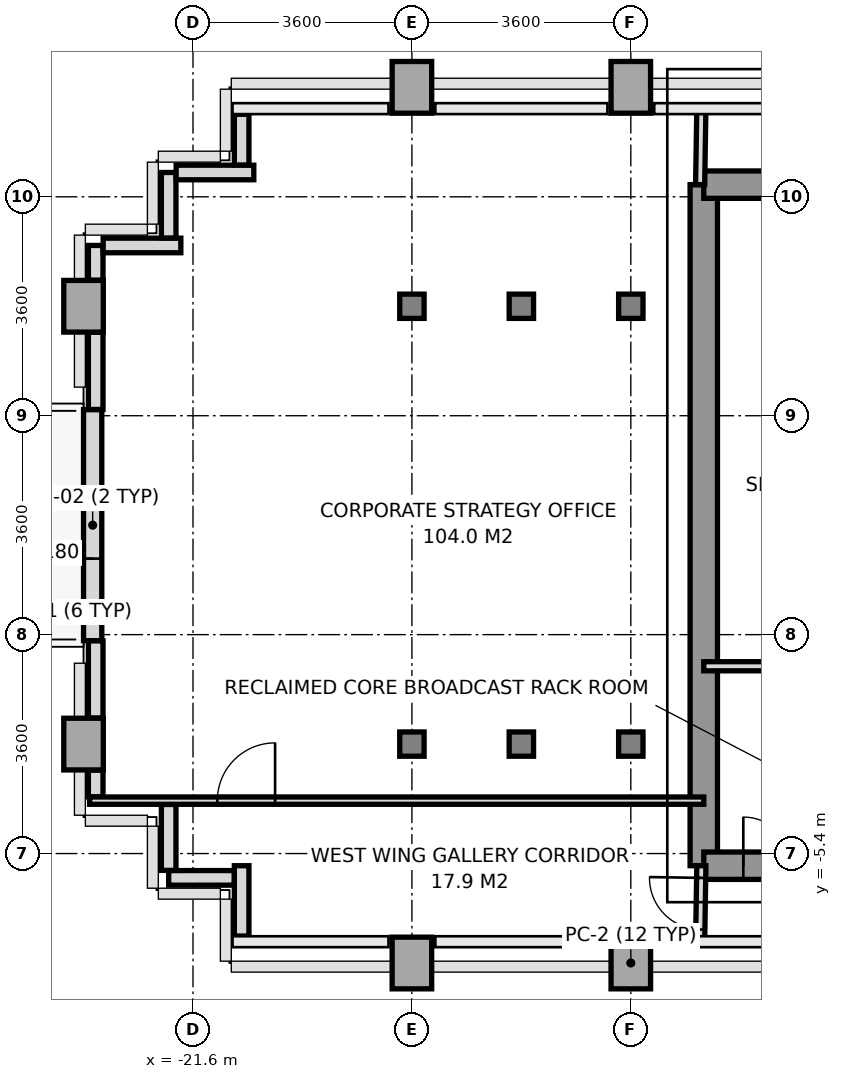
"""IFC4 building model, lengths in metres.
Left out: names, types, materials, properties, quantities, classifications, styles, units other than length and angle.
Written with IfcOpenShell. Run it as: python <this file> out.ifc"""

import sys

from ifc_helpers import new_model, si_unit, direction, frame, frame_2d, origin, origin_2d, place, context, subcontext, project, spatial, rectangle, i_section, extrude, source, transform, mapped, element, fill, save


model = new_model("IFC4")
c1 = context("Model", 3, precision=1e-05, world=origin(), true_north=direction((0.0, 1.0)))
c2 = subcontext(c1, "Body", "Model", "MODEL_VIEW")
j1 = project(units=[si_unit("LENGTHUNIT", "METRE"), si_unit("PLANEANGLEUNIT", "RADIAN")], contexts=[c1])
p1 = place(None, origin())
s1 = spatial("IfcSite", under=j1, at=p1, CompositionType="ELEMENT")
p2 = place(p1, origin())
s2 = spatial("IfcBuilding", under=s1, at=p2, CompositionType="ELEMENT")
p3 = place(p2, frame((0.0, 0.0, 100.6)))
s3 = spatial("IfcBuildingStorey", under=s2, at=p3, CompositionType="ELEMENT", Elevation=100.6)
m1 = source(origin(), c2, "Body", "SweptSolid", [
    extrude(rectangle(XDim=0.65, YDim=0.85, at=origin_2d()), origin(), (0.0, 0.0, 1.0), 3.2),
])
for number, where, z_axis, x_axis in (
    (1, (-23.4, -3.6, 0.0), (0.0, 0.0, 1.0), (1.0, 0.0, 0.0)),
    (2, (-23.4, 3.6, 0.0), (0.0, 0.0, 1.0), (1.0, 0.0, 0.0)),
    (3, (-18.0, -7.2, 0.0), (0.0, 0.0, 1.0), (1.0, 0.0, 0.0)),
):
    element("IfcColumn", number, at=place(p3, frame(where, z_axis=z_axis, x_axis=x_axis)), inside=s3, PredefinedType="COLUMN", context=c2, shape_type="MappedRepresentation", body=[
        mapped(m1, transform((0.0, 0.0, 0.0), x_axis=(1.0, 0.0, 0.0), y_axis=(0.0, 1.0, 0.0), z_axis=(0.0, 0.0, 1.0), scale=1.0)),
    ])
m2 = source(origin(), c2, "Body", "SweptSolid", [
    extrude(i_section(OverallWidth=0.401, OverallDepth=0.399, WebThickness=0.02, FlangeThickness=0.032, at=origin_2d()), origin(), (0.0, 0.0, 1.0), 3.2),
])
for number, where, z_axis, x_axis in (
    (4, (-18.0, -3.6, 0.0), (0.0, 0.0, 1.0), (1.0, 0.0, 0.0)),
    (5, (-18.0, 3.6, 0.0), (0.0, 0.0, 1.0), (1.0, 0.0, 0.0)),
):
    element("IfcColumn", number, at=place(p3, frame(where, z_axis=z_axis, x_axis=x_axis)), inside=s3, PredefinedType="COLUMN", context=c2, shape_type="MappedRepresentation", body=[
        mapped(m2, transform((0.0, 0.0, 0.0), x_axis=(1.0, 0.0, 0.0), y_axis=(0.0, 1.0, 0.0), z_axis=(0.0, 0.0, 1.0), scale=1.0)),
    ])
p4 = place(p3, frame((-18.0, 7.2, 0.0), z_axis=(0.0, 0.0, 1.0), x_axis=(1.0, 0.0, 0.0)))
e6 = element("IfcColumn", 6, at=p4, inside=s3, PredefinedType="COLUMN", context=c2, shape_type="MappedRepresentation", body=[
    mapped(m1, transform((0.0, 0.0, 0.0), x_axis=(1.0, 0.0, 0.0), y_axis=(0.0, 1.0, 0.0), z_axis=(0.0, 0.0, 1.0), scale=1.0)),
])
for number, where, z_axis, x_axis in (
    (7, (-16.2, -3.6, 0.0), (0.0, 0.0, 1.0), (1.0, 0.0, 0.0)),
    (8, (-16.2, 3.6, 0.0), (0.0, 0.0, 1.0), (1.0, 0.0, 0.0)),
):
    element("IfcColumn", number, at=place(p3, frame(where, z_axis=z_axis, x_axis=x_axis)), inside=s3, PredefinedType="COLUMN", context=c2, shape_type="MappedRepresentation", body=[
        mapped(m2, transform((0.0, 0.0, 0.0), x_axis=(1.0, 0.0, 0.0), y_axis=(0.0, 1.0, 0.0), z_axis=(0.0, 0.0, 1.0), scale=1.0)),
    ])
p5 = place(p3, frame((-14.4, -7.2, 0.0), z_axis=(0.0, 0.0, 1.0), x_axis=(1.0, 0.0, 0.0)))
e9 = element("IfcColumn", 9, at=p5, inside=s3, PredefinedType="COLUMN", context=c2, shape_type="MappedRepresentation", body=[
    mapped(m1, transform((0.0, 0.0, 0.0), x_axis=(1.0, 0.0, 0.0), y_axis=(0.0, 1.0, 0.0), z_axis=(0.0, 0.0, 1.0), scale=1.0)),
])
for number, where, z_axis, x_axis in (
    (10, (-14.4, -3.6, 0.0), (0.0, 0.0, 1.0), (1.0, 0.0, 0.0)),
    (11, (-14.4, 3.6, 0.0), (0.0, 0.0, 1.0), (1.0, 0.0, 0.0)),
):
    element("IfcColumn", number, at=place(p3, frame(where, z_axis=z_axis, x_axis=x_axis)), inside=s3, PredefinedType="COLUMN", context=c2, shape_type="MappedRepresentation", body=[
        mapped(m2, transform((0.0, 0.0, 0.0), x_axis=(1.0, 0.0, 0.0), y_axis=(0.0, 1.0, 0.0), z_axis=(0.0, 0.0, 1.0), scale=1.0)),
    ])
p6 = place(p3, frame((-14.4, 7.2, 0.0), z_axis=(0.0, 0.0, 1.0), x_axis=(1.0, 0.0, 0.0)))
e12 = element("IfcColumn", 12, at=p6, inside=s3, PredefinedType="COLUMN", context=c2, shape_type="MappedRepresentation", body=[
    mapped(m1, transform((0.0, 0.0, 0.0), x_axis=(1.0, 0.0, 0.0), y_axis=(0.0, 1.0, 0.0), z_axis=(0.0, 0.0, 1.0), scale=1.0)),
])
p7 = place(p3, frame((-23.25, -1.9, 0.0), z_axis=(0.0, 0.0, 1.0), x_axis=(0.0, 1.0, 0.0)))
e13 = element("IfcWall", 13, at=p7, inside=s3, PredefinedType="SOLIDWALL", context=c2, shape_type="SweptSolid", body=[
    extrude(rectangle(XDim=3.8, YDim=0.3, at=frame_2d((1.9, 0.0))), origin(), (0.0, 0.0, 1.0), 2.45),
])
p8 = place(p7, frame((1.35, 0.0, 0.0)))
e14 = element("IfcOpeningElement", 14, at=p8, cuts=e13, PredefinedType="OPENING", context=c2, shape_type="SweptSolid", body=[
    extrude(rectangle(XDim=1.1, YDim=2.3, at=frame_2d((0.55, 1.15))), frame((0.0, 0.16, 0.0), z_axis=(0.0, -1.0, 0.0), x_axis=(1.0, 0.0, 0.0)), (0.0, 0.0, 1.0), 0.32),
])
p9 = place(p3, frame((-20.8, -6.757, 0.0), z_axis=(0.0, 0.0, 1.0), x_axis=(0.0, 1.0, 0.0)))
e15 = element("IfcWall", 15, at=p9, inside=s3, PredefinedType="PARAPET", context=c2, shape_type="SweptSolid", body=[
    extrude(rectangle(XDim=1.157, YDim=0.24, at=frame_2d((0.579, 0.0))), origin(), (0.0, 0.0, 1.0), 1.15),
])
p10 = place(p3, frame((-20.923, -5.8, 0.0), z_axis=(0.0, 0.0, 1.0), x_axis=(-1.0, 0.0, 0.0)))
e16 = element("IfcWall", 16, at=p10, inside=s3, PredefinedType="PARAPET", context=c2, shape_type="SweptSolid", body=[
    extrude(rectangle(XDim=1.077, YDim=0.24, at=frame_2d((0.539, 0.0))), origin(), (0.0, 0.0, 1.0), 1.15),
])
p11 = place(p3, frame((-22.0, -5.677, 0.0), z_axis=(0.0, 0.0, 1.0), x_axis=(0.0, 1.0, 0.0)))
e17 = element("IfcWall", 17, at=p11, inside=s3, PredefinedType="PARAPET", context=c2, shape_type="SweptSolid", body=[
    extrude(rectangle(XDim=1.084, YDim=0.24, at=frame_2d((0.542, 0.0))), origin(), (0.0, 0.0, 1.0), 1.15),
])
p12 = place(p3, frame((-23.2, -4.467, 0.0), z_axis=(0.0, 0.0, 1.0), x_axis=(0.0, 1.0, 0.0)))
e18 = element("IfcWall", 18, at=p12, inside=s3, PredefinedType="PARAPET", context=c2, shape_type="SweptSolid", body=[
    extrude(rectangle(XDim=0.439, YDim=0.24, at=frame_2d((0.219, 0.0))), origin(), (0.0, 0.0, 1.0), 1.15),
])
for number, where, z_axis, x_axis in (
    (19, (-23.2, -3.172, 0.0), (0.0, 0.0, 1.0), (0.0, 1.0, 0.0)),
    (20, (-23.2, 1.903, 0.0), (0.0, 0.0, 1.0), (0.0, 1.0, 0.0)),
):
    element("IfcWall", number, at=place(p3, frame(where, z_axis=z_axis, x_axis=x_axis)), inside=s3, PredefinedType="PARAPET", context=c2, shape_type="SweptSolid", body=[
        extrude(rectangle(XDim=1.269, YDim=0.24, at=frame_2d((0.635, 0.0))), origin(), (0.0, 0.0, 1.0), 1.15),
    ])
p13 = place(p3, frame((-23.2, 4.028, 0.0), z_axis=(0.0, 0.0, 1.0), x_axis=(0.0, 1.0, 0.0)))
e21 = element("IfcWall", 21, at=p13, inside=s3, PredefinedType="PARAPET", context=c2, shape_type="SweptSolid", body=[
    extrude(rectangle(XDim=0.572, YDim=0.24, at=frame_2d((0.286, 0.0))), origin(), (0.0, 0.0, 1.0), 1.15),
])
p14 = place(p3, frame((-23.077, 4.6, 0.0), z_axis=(0.0, 0.0, 1.0), x_axis=(1.0, 0.0, 0.0)))
e22 = element("IfcWall", 22, at=p14, inside=s3, PredefinedType="PARAPET", context=c2, shape_type="SweptSolid", body=[
    extrude(rectangle(XDim=1.277, YDim=0.24, at=frame_2d((0.638, 0.0))), origin(), (0.0, 0.0, 1.0), 1.15),
])
p15 = place(p3, frame((-22.0, 4.723, 0.0), z_axis=(0.0, 0.0, 1.0), x_axis=(0.0, 1.0, 0.0)))
e23 = element("IfcWall", 23, at=p15, inside=s3, PredefinedType="PARAPET", context=c2, shape_type="SweptSolid", body=[
    extrude(rectangle(XDim=1.077, YDim=0.24, at=frame_2d((0.539, 0.0))), origin(), (0.0, 0.0, 1.0), 1.15),
])
p16 = place(p3, frame((-21.877, 5.8, 0.0), z_axis=(0.0, 0.0, 1.0), x_axis=(1.0, 0.0, 0.0)))
e24 = element("IfcWall", 24, at=p16, inside=s3, PredefinedType="PARAPET", context=c2, shape_type="SweptSolid", body=[
    extrude(rectangle(XDim=1.277, YDim=0.24, at=frame_2d((0.638, 0.0))), origin(), (0.0, 0.0, 1.0), 1.15),
])
p17 = place(p3, frame((-20.8, 5.923, 0.0), z_axis=(0.0, 0.0, 1.0), x_axis=(0.0, 1.0, 0.0)))
e25 = element("IfcWall", 25, at=p17, inside=s3, PredefinedType="PARAPET", context=c2, shape_type="SweptSolid", body=[
    extrude(rectangle(XDim=0.834, YDim=0.24, at=frame_2d((0.417, 0.0))), origin(), (0.0, 0.0, 1.0), 1.15),
])
p18 = place(p3, frame((-13.2, -5.6, 0.0), z_axis=(0.0, 0.0, 1.0), x_axis=(0.0, 1.0, 0.0)))
e26 = element("IfcWall", 26, at=p18, inside=s3, PredefinedType="SHEAR", context=c2, shape_type="SweptSolid", body=[
    extrude(rectangle(XDim=11.2, YDim=0.45, at=frame_2d((5.6, 0.0))), origin(), (0.0, 0.0, 1.0), 3.2),
])
p19 = place(p3, frame((-13.2, 5.6, 0.0), z_axis=(0.0, 0.0, 1.0), x_axis=(1.0, 0.0, 0.0)))
e27 = element("IfcWall", 27, at=p19, inside=s3, PredefinedType="SHEAR", context=c2, shape_type="SweptSolid", body=[
    extrude(rectangle(XDim=1.819, YDim=0.45, at=frame_2d((0.909, 0.0))), origin(), (0.0, 0.0, 1.0), 3.2),
])
p20 = place(p3, frame((-13.2, -5.6, 0.0), z_axis=(0.0, 0.0, 1.0), x_axis=(1.0, 0.0, 0.0)))
e28 = element("IfcWall", 28, at=p20, inside=s3, PredefinedType="SHEAR", context=c2, shape_type="SweptSolid", body=[
    extrude(rectangle(XDim=7.8, YDim=0.45, at=frame_2d((3.9, 0.0))), origin(), (0.0, 0.0, 1.0), 3.2),
])
p21 = place(p20, frame((3.6, 0.0, 0.0)))
e29 = element("IfcOpeningElement", 29, at=p21, cuts=e28, PredefinedType="OPENING", context=c2, shape_type="SweptSolid", body=[
    extrude(rectangle(XDim=1.2, YDim=2.2, at=frame_2d((0.6, 1.1))), frame((0.0, 0.235, 0.0), z_axis=(0.0, -1.0, 0.0), x_axis=(1.0, 0.0, 0.0)), (0.0, 0.0, 1.0), 0.47),
])
p22 = place(p20, frame((0.65, 0.0, 0.0)))
e30 = element("IfcOpeningElement", 30, at=p22, cuts=e28, PredefinedType="OPENING", context=c2, shape_type="SweptSolid", body=[
    extrude(rectangle(XDim=0.8, YDim=2.1, at=frame_2d((0.4, 1.05))), frame((0.0, 0.235, 0.0), z_axis=(0.0, -1.0, 0.0), x_axis=(1.0, 0.0, 0.0)), (0.0, 0.0, 1.0), 0.47),
])
p23 = place(p3, frame((-13.2, -2.32, 0.0), z_axis=(0.0, 0.0, 1.0), x_axis=(1.0, 0.0, 0.0)))
e31 = element("IfcWall", 31, at=p23, inside=s3, PredefinedType="PARTITIONING", context=c2, shape_type="SweptSolid", body=[
    extrude(rectangle(XDim=2.18, YDim=0.15, at=frame_2d((1.09, 0.0))), origin(), (0.0, 0.0, 1.0), 3.2),
])
p24 = place(p3, frame((-13.26, 5.6, 0.0), z_axis=(0.0, 0.0, 1.0), x_axis=(0.016013571389, 0.999871774545, 0.0)))
e32 = element("IfcWall", 32, at=p24, inside=s3, PredefinedType="PARTITIONING", context=c2, shape_type="SweptSolid", body=[
    extrude(rectangle(XDim=1.25, YDim=0.15, at=frame_2d((0.625, 0.0))), origin(), (0.0, 0.0, 1.0), 3.2),
])
p25 = place(p3, frame((-13.26, -6.85, 0.0), z_axis=(0.0, 0.0, 1.0), x_axis=(0.016013571389, 0.999871774545, 0.0)))
e33 = element("IfcWall", 33, at=p25, inside=s3, PredefinedType="PARTITIONING", context=c2, shape_type="SweptSolid", body=[
    extrude(rectangle(XDim=1.25, YDim=0.15, at=frame_2d((0.625, 0.0))), origin(), (0.0, 0.0, 1.0), 3.2),
])
p26 = place(p25, frame((0.2, 0.0, 0.0)))
e34 = element("IfcOpeningElement", 34, at=p26, cuts=e33, PredefinedType="OPENING", context=c2, shape_type="SweptSolid", body=[
    extrude(rectangle(XDim=0.85, YDim=2.1, at=frame_2d((0.425, 1.05))), frame((0.0, 0.085, 0.0), z_axis=(0.0, -1.0, 0.0), x_axis=(1.0, 0.0, 0.0)), (0.0, 0.0, 1.0), 0.17),
])
p27 = place(p3, frame((-23.3, -4.53, 0.0), z_axis=(0.0, 0.0, 1.0), x_axis=(1.0, 0.0, 0.0)))
e35 = element("IfcWall", 35, at=p27, inside=s3, PredefinedType="PARTITIONING", context=c2, shape_type="SweptSolid", body=[
    extrude(rectangle(XDim=10.1, YDim=0.12, at=frame_2d((5.05, 0.0))), origin(), (0.0, 0.0, 1.0), 2.75),
])
p28 = place(p27, frame((2.1, 0.0, 0.0)))
e36 = element("IfcOpeningElement", 36, at=p28, cuts=e35, PredefinedType="OPENING", context=c2, shape_type="SweptSolid", body=[
    extrude(rectangle(XDim=0.95, YDim=2.15, at=frame_2d((0.475, 1.075))), frame((0.0, 0.07, 0.0), z_axis=(0.0, -1.0, 0.0), x_axis=(1.0, 0.0, 0.0)), (0.0, 0.0, 1.0), 0.14),
])
m3 = source(origin(), c2, "Body", "SweptSolid", [
    extrude(rectangle(XDim=1.1, YDim=2.3, at=frame_2d((0.55, 1.15))), frame((0.0, 0.025, 0.0), z_axis=(0.0, -1.0, 0.0), x_axis=(1.0, 0.0, 0.0)), (0.0, 0.0, 1.0), 0.05),
])
p29 = place(p8, origin())
e37 = element("IfcDoor", 37, at=p29, inside=s3, OperationType="SINGLE_SWING_LEFT", PredefinedType="DOOR", context=c2, shape_type="MappedRepresentation", body=[
    mapped(m3, transform((0.0, 0.0, 0.0), x_axis=(1.0, 0.0, 0.0), y_axis=(0.0, 1.0, 0.0), z_axis=(0.0, 0.0, 1.0), scale=1.0)),
])
fill(e14, e37)
m4 = source(origin(), c2, "Body", "SweptSolid", [
    extrude(rectangle(XDim=0.8, YDim=2.1, at=frame_2d((0.4, 1.05))), frame((0.0, 0.025, 0.0), z_axis=(0.0, -1.0, 0.0), x_axis=(1.0, 0.0, 0.0)), (0.0, 0.0, 1.0), 0.05),
])
p30 = place(p22, origin())
e38 = element("IfcDoor", 38, at=p30, inside=s3, OperationType="SINGLE_SWING_LEFT", PredefinedType="DOOR", context=c2, shape_type="MappedRepresentation", body=[
    mapped(m4, transform((0.0, 0.0, 0.0), x_axis=(1.0, 0.0, 0.0), y_axis=(0.0, 1.0, 0.0), z_axis=(0.0, 0.0, 1.0), scale=1.0)),
])
fill(e30, e38)
m5 = source(origin(), c2, "Body", "SweptSolid", [
    extrude(rectangle(XDim=0.85, YDim=2.1, at=frame_2d((0.425, 1.05))), frame((0.0, 0.025, 0.0), z_axis=(0.0, -1.0, 0.0), x_axis=(1.0, 0.0, 0.0)), (0.0, 0.0, 1.0), 0.05),
])
p31 = place(p26, origin())
e39 = element("IfcDoor", 39, at=p31, inside=s3, OperationType="SINGLE_SWING_RIGHT", PredefinedType="DOOR", context=c2, shape_type="MappedRepresentation", body=[
    mapped(m5, transform((0.0, 0.0, 0.0), x_axis=(1.0, 0.0, 0.0), y_axis=(0.0, 1.0, 0.0), z_axis=(0.0, 0.0, 1.0), scale=1.0)),
])
fill(e34, e39)
m6 = source(origin(), c2, "Body", "SweptSolid", [
    extrude(rectangle(XDim=0.95, YDim=2.15, at=frame_2d((0.475, 1.075))), frame((0.0, 0.025, 0.0), z_axis=(0.0, -1.0, 0.0), x_axis=(1.0, 0.0, 0.0)), (0.0, 0.0, 1.0), 0.05),
])
p32 = place(p28, origin())
e40 = element("IfcDoor", 40, at=p32, inside=s3, OperationType="SINGLE_SWING_RIGHT", PredefinedType="DOOR", context=c2, shape_type="MappedRepresentation", body=[
    mapped(m6, transform((0.0, 0.0, 0.0), x_axis=(1.0, 0.0, 0.0), y_axis=(0.0, 1.0, 0.0), z_axis=(0.0, 0.0, 1.0), scale=1.0)),
])
fill(e36, e40)
save(model, sys.argv[1])
